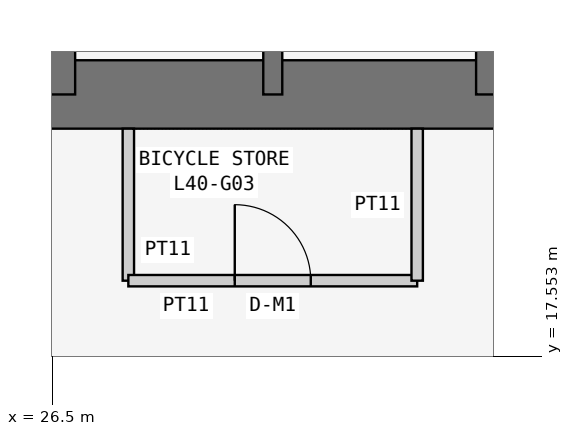
"""IFC4 building model, lengths in metres.
Left out: names, types, materials, properties, quantities, classifications, styles, units other than length and angle.
Written with IfcOpenShell. Run it as: python <this file> out.ifc"""

import sys

from ifc_helpers import new_model, si_unit, direction, frame, frame_2d, origin, place, context, subcontext, project, spatial, rectangle, extrude, element, fill, save


model = new_model("IFC4")
c1 = context("Model", 3, precision=1e-05, world=origin(), true_north=direction((0.0, 1.0)))
c2 = subcontext(c1, "Body", "Model", "MODEL_VIEW")
j1 = project(units=[si_unit("LENGTHUNIT", "METRE"), si_unit("PLANEANGLEUNIT", "RADIAN")], contexts=[c1])
p1 = place(None, origin())
s1 = spatial("IfcSite", under=j1, at=p1, CompositionType="ELEMENT")
p2 = place(p1, origin())
s2 = spatial("IfcBuilding", under=s1, at=p2, CompositionType="ELEMENT")
p3 = place(p2, frame((0.0, 0.0, 155.7)))
s3 = spatial("IfcBuildingStorey", under=s2, at=p3, CompositionType="ELEMENT", Elevation=155.7)
p4 = place(p3, frame((21.0, 21.0, 0.0), z_axis=(0.0, 0.0, 1.0), x_axis=(1.0, 0.0, 0.0)))
e1 = element("IfcWall", 1, at=p4, inside=s3, PredefinedType="SHEAR", context=c2, shape_type="SweptSolid", body=[
    extrude(rectangle(XDim=17.25, YDim=0.9, at=frame_2d((8.625, 0.0))), origin(), (0.0, 0.0, 1.0), 3.6),
])
p5 = place(p3, frame((26.6, 21.0, 0.0), z_axis=(0.0, 0.0, 1.0), x_axis=(0.0, 1.0, 0.0)))
e2 = element("IfcWall", 2, at=p5, inside=s3, PredefinedType="SHEAR", context=c2, shape_type="SweptSolid", body=[
    extrude(rectangle(XDim=16.8, YDim=0.4, at=frame_2d((8.4, 0.0))), origin(), (0.0, 0.0, 1.0), 3.6),
])
p6 = place(p5, frame((10.4, 0.0, 0.0)))
e3 = element("IfcOpeningElement", 3, at=p6, cuts=e2, PredefinedType="OPENING", context=c2, shape_type="SweptSolid", body=[
    extrude(rectangle(XDim=1.2, YDim=2.1, at=frame_2d((0.6, 1.05))), frame((0.0, 0.21, 0.0), z_axis=(0.0, -1.0, 0.0), x_axis=(1.0, 0.0, 0.0)), (0.0, 0.0, 1.0), 0.42),
])
for number, where, z_axis, x_axis in (
    (4, (29.4, 21.0, 0.0), (0.0, 0.0, 1.0), (0.0, 1.0, 0.0)),
    (5, (32.2, 21.0, 0.0), (0.0, 0.0, 1.0), (0.0, 1.0, 0.0)),
):
    element("IfcWall", number, at=place(p3, frame(where, z_axis=z_axis, x_axis=x_axis)), inside=s3, PredefinedType="SHEAR", context=c2, shape_type="SweptSolid", body=[
        extrude(rectangle(XDim=3.2, YDim=0.25, at=frame_2d((1.6, 0.0))), origin(), (0.0, 0.0, 1.0), 3.6),
    ])
p7 = place(p3, frame((27.5, 20.55, 0.0), z_axis=(0.0, 0.0, 1.0), x_axis=(0.0, -1.0, 0.0)))
e6 = element("IfcWall", 6, at=p7, inside=s3, PredefinedType="PARTITIONING", context=c2, shape_type="SweptSolid", body=[
    extrude(rectangle(XDim=2.0, YDim=0.15, at=frame_2d((1.0, 0.0))), origin(), (0.0, 0.0, 1.0), 3.45),
])
p8 = place(p3, frame((27.5, 18.55, 0.0), z_axis=(0.0, 0.0, 1.0), x_axis=(1.0, 0.0, 0.0)))
e7 = element("IfcWall", 7, at=p8, inside=s3, PredefinedType="PARTITIONING", context=c2, shape_type="SweptSolid", body=[
    extrude(rectangle(XDim=3.8, YDim=0.15, at=frame_2d((1.9, 0.0))), origin(), (0.0, 0.0, 1.0), 3.45),
])
p9 = place(p8, frame((1.4, 0.0, 0.0)))
e8 = element("IfcOpeningElement", 8, at=p9, cuts=e7, PredefinedType="OPENING", context=c2, shape_type="SweptSolid", body=[
    extrude(rectangle(XDim=1.0, YDim=2.1, at=frame_2d((0.5, 1.05))), frame((0.0, 0.085, 0.0), z_axis=(0.0, -1.0, 0.0), x_axis=(1.0, 0.0, 0.0)), (0.0, 0.0, 1.0), 0.17),
])
p10 = place(p3, frame((31.3, 18.55, 0.0), z_axis=(0.0, 0.0, 1.0), x_axis=(0.0, 1.0, 0.0)))
e9 = element("IfcWall", 9, at=p10, inside=s3, PredefinedType="PARTITIONING", context=c2, shape_type="SweptSolid", body=[
    extrude(rectangle(XDim=2.0, YDim=0.15, at=frame_2d((1.0, 0.0))), origin(), (0.0, 0.0, 1.0), 3.45),
])
p11 = place(p9, origin())
e10 = element("IfcDoor", 10, at=p11, inside=s3, OperationType="SINGLE_SWING_LEFT", PredefinedType="DOOR", context=c2, shape_type="SweptSolid", body=[
    extrude(rectangle(XDim=1.0, YDim=2.1, at=frame_2d((0.5, 1.05))), frame((0.0, 0.025, 0.0), z_axis=(0.0, -1.0, 0.0), x_axis=(1.0, 0.0, 0.0)), (0.0, 0.0, 1.0), 0.05),
])
fill(e8, e10)
save(model, sys.argv[1])
